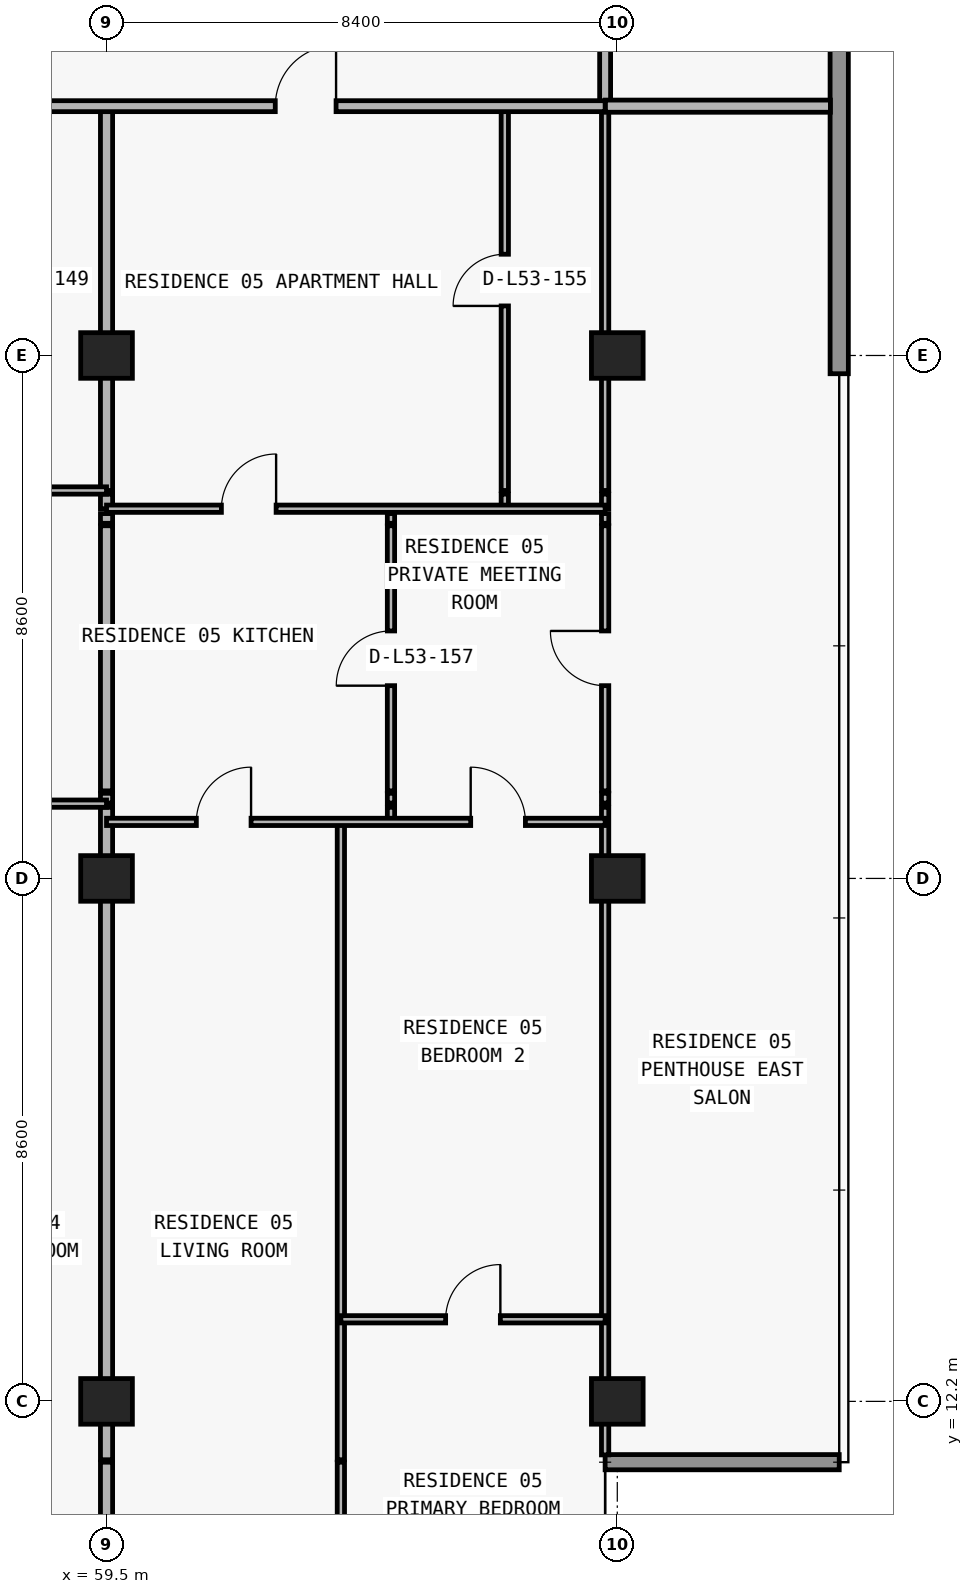
"""IFC4 building model, lengths in metres.
Left out: names, types, materials, properties, quantities, classifications, styles, units other than length and angle.
Written with IfcOpenShell. Run it as: python <this file> out.ifc"""

import sys

from ifc_helpers import new_model, si_unit, direction, frame, frame_2d, origin, origin_2d, place, context, subcontext, project, spatial, rectangle, extrude, element, fill, save


model = new_model("IFC4")
c1 = context("Model", 3, precision=1e-05, world=origin(), true_north=direction((0.0, 1.0)))
c2 = subcontext(c1, "Body", "Model", "MODEL_VIEW")
j1 = project(units=[si_unit("LENGTHUNIT", "METRE"), si_unit("PLANEANGLEUNIT", "RADIAN")], contexts=[c1])
p1 = place(None, origin())
s1 = spatial("IfcSite", under=j1, at=p1, CompositionType="ELEMENT")
p2 = place(p1, origin())
s2 = spatial("IfcBuilding", under=s1, at=p2, CompositionType="ELEMENT")
p3 = place(p2, frame((0.0, 0.0, 191.7)))
s3 = spatial("IfcBuildingStorey", under=s2, at=p3, CompositionType="ELEMENT", Elevation=191.7)
for number, where, z_axis, x_axis in (
    (1, (59.5, 12.2, 0.0), (0.0, 0.0, 1.0), (1.0, 0.0, 0.0)),
    (2, (67.9, 12.2, 0.0), (0.0, 0.0, 1.0), (1.0, 0.0, 0.0)),
    (3, (59.5, 20.8, 0.0), (0.0, 0.0, 1.0), (1.0, 0.0, 0.0)),
    (4, (67.9, 20.8, 0.0), (0.0, 0.0, 1.0), (1.0, 0.0, 0.0)),
    (5, (59.5, 29.4, 0.0), (0.0, 0.0, 1.0), (1.0, 0.0, 0.0)),
    (6, (67.9, 29.4, 0.0), (0.0, 0.0, 1.0), (1.0, 0.0, 0.0)),
):
    element("IfcColumn", number, at=place(p3, frame(where, z_axis=z_axis, x_axis=x_axis)), inside=s3, PredefinedType="COLUMN", context=c2, shape_type="SweptSolid", body=[
        extrude(rectangle(XDim=0.85, YDim=0.75, at=origin_2d()), origin(), (0.0, 0.0, 1.0), 3.05),
    ])
p4 = place(p3, frame((67.7, 11.2, 0.0), z_axis=(0.0, 0.0, 1.0), x_axis=(1.0, 0.0, 0.0)))
e7 = element("IfcWall", 7, at=p4, inside=s3, PredefinedType="ELEMENTEDWALL", context=c2, shape_type="SweptSolid", body=[
    extrude(rectangle(XDim=3.85, YDim=0.25, at=frame_2d((1.925, 0.0))), origin(), (0.0, 0.0, 1.0), 3.05),
])
p5 = place(p3, frame((71.55, 47.0, 0.0), z_axis=(0.0, 0.0, 1.0), x_axis=(0.0, -1.0, 0.0)))
e8 = element("IfcWall", 8, at=p5, inside=s3, PredefinedType="STANDARD", context=c2, shape_type="SweptSolid", body=[
    extrude(rectangle(XDim=17.9, YDim=0.3, at=frame_2d((8.95, 0.0))), origin(), (0.0, 0.0, 1.0), 3.05),
])
p6 = place(p3, frame((59.5, 7.895, 0.0), z_axis=(0.0, 0.0, 1.0), x_axis=(0.0, 1.0, 0.0)))
e9 = element("IfcWall", 9, at=p6, inside=s3, PredefinedType="PARTITIONING", context=c2, shape_type="SweptSolid", body=[
    extrude(rectangle(XDim=3.305, YDim=0.2, at=frame_2d((1.652, 0.0))), origin(), (0.0, 0.0, 1.0), 3.05),
])
p7 = place(p3, frame((59.5, 11.24, 0.0), z_axis=(0.0, 0.0, 1.0), x_axis=(0.0, 1.0, 0.0)))
e10 = element("IfcWall", 10, at=p7, inside=s3, PredefinedType="PARTITIONING", context=c2, shape_type="SweptSolid", body=[
    extrude(rectangle(XDim=10.73, YDim=0.2, at=frame_2d((5.365, 0.0))), origin(), (0.0, 0.0, 1.0), 2.263),
])
p8 = place(p3, frame((59.5, 22.04, 0.0), z_axis=(0.0, 0.0, 1.0), x_axis=(0.0, 1.0, 0.0)))
e11 = element("IfcWall", 11, at=p8, inside=s3, PredefinedType="PARTITIONING", context=c2, shape_type="SweptSolid", body=[
    extrude(rectangle(XDim=0.16, YDim=0.2, at=frame_2d((0.08, 0.0))), origin(), (0.0, 0.0, 1.0), 2.263),
])
p9 = place(p3, frame((59.5, 22.24, 0.0), z_axis=(0.0, 0.0, 1.0), x_axis=(0.0, 1.0, 0.0)))
e12 = element("IfcWall", 12, at=p9, inside=s3, PredefinedType="PARTITIONING", context=c2, shape_type="SweptSolid", body=[
    extrude(rectangle(XDim=4.36, YDim=0.2, at=frame_2d((2.18, 0.0))), origin(), (0.0, 0.0, 1.0), 2.263),
])
p10 = place(p3, frame((59.5, 26.64, 0.0), z_axis=(0.0, 0.0, 1.0), x_axis=(0.0, 1.0, 0.0)))
e13 = element("IfcWall", 13, at=p10, inside=s3, PredefinedType="PARTITIONING", context=c2, shape_type="SweptSolid", body=[
    extrude(rectangle(XDim=0.16, YDim=0.2, at=frame_2d((0.08, 0.0))), origin(), (0.0, 0.0, 1.0), 2.263),
])
p11 = place(p3, frame((59.5, 26.88, 0.0), z_axis=(0.0, 0.0, 1.0), x_axis=(0.0, 1.0, 0.0)))
e14 = element("IfcWall", 14, at=p11, inside=s3, PredefinedType="PARTITIONING", context=c2, shape_type="SweptSolid", body=[
    extrude(rectangle(XDim=0.24, YDim=0.2, at=frame_2d((0.12, 0.0))), origin(), (0.0, 0.0, 1.0), 2.263),
])
p12 = place(p3, frame((59.5, 27.18, 0.0), z_axis=(0.0, 0.0, 1.0), x_axis=(0.0, 1.0, 0.0)))
e15 = element("IfcWall", 15, at=p12, inside=s3, PredefinedType="PARTITIONING", context=c2, shape_type="SweptSolid", body=[
    extrude(rectangle(XDim=6.32, YDim=0.2, at=frame_2d((3.16, 0.0))), origin(), (0.0, 0.0, 1.0), 2.263),
])
p13 = place(p3, frame((63.354, 7.895, 0.0), z_axis=(0.0, 0.0, 1.0), x_axis=(0.0, 1.0, 0.0)))
e16 = element("IfcWall", 16, at=p13, inside=s3, PredefinedType="PARTITIONING", context=c2, shape_type="SweptSolid", body=[
    extrude(rectangle(XDim=3.305, YDim=0.12, at=frame_2d((1.652, 0.0))), origin(), (0.0, 0.0, 1.0), 3.05),
])
p14 = place(p3, frame((63.354, 11.24, 0.0), z_axis=(0.0, 0.0, 1.0), x_axis=(0.0, 1.0, 0.0)))
e17 = element("IfcWall", 17, at=p14, inside=s3, PredefinedType="PARTITIONING", context=c2, shape_type="SweptSolid", body=[
    extrude(rectangle(XDim=10.49, YDim=0.12, at=frame_2d((5.245, 0.0))), origin(), (0.0, 0.0, 1.0), 3.05),
])
p15 = place(p3, frame((64.178, 21.73, 0.0), z_axis=(0.0, 0.0, 1.0), x_axis=(0.0, 1.0, 0.0)))
e18 = element("IfcWall", 18, at=p15, inside=s3, PredefinedType="PARTITIONING", context=c2, shape_type="SweptSolid", body=[
    extrude(rectangle(XDim=0.24, YDim=0.12, at=frame_2d((0.12, 0.0))), origin(), (0.0, 0.0, 1.0), 3.05),
])
p16 = place(p3, frame((64.178, 22.04, 0.0), z_axis=(0.0, 0.0, 1.0), x_axis=(0.0, 1.0, 0.0)))
e19 = element("IfcWall", 19, at=p16, inside=s3, PredefinedType="PARTITIONING", context=c2, shape_type="SweptSolid", body=[
    extrude(rectangle(XDim=0.16, YDim=0.12, at=frame_2d((0.08, 0.0))), origin(), (0.0, 0.0, 1.0), 3.05),
])
p17 = place(p3, frame((64.178, 22.24, 0.0), z_axis=(0.0, 0.0, 1.0), x_axis=(0.0, 1.0, 0.0)))
e20 = element("IfcWall", 20, at=p17, inside=s3, PredefinedType="PARTITIONING", context=c2, shape_type="SweptSolid", body=[
    extrude(rectangle(XDim=4.36, YDim=0.12, at=frame_2d((2.18, 0.0))), origin(), (0.0, 0.0, 1.0), 3.05),
])
p18 = place(p17, frame((1.73, 0.0, 0.0)))
e21 = element("IfcOpeningElement", 21, at=p18, cuts=e20, PredefinedType="OPENING", context=c2, shape_type="SweptSolid", body=[
    extrude(rectangle(XDim=0.9, YDim=2.15, at=frame_2d((0.45, 1.075))), frame((0.0, 0.07, 0.0), z_axis=(0.0, -1.0, 0.0), x_axis=(1.0, 0.0, 0.0)), (0.0, 0.0, 1.0), 0.14),
])
p19 = place(p3, frame((64.178, 26.64, 0.0), z_axis=(0.0, 0.0, 1.0), x_axis=(0.0, 1.0, 0.0)))
e22 = element("IfcWall", 22, at=p19, inside=s3, PredefinedType="PARTITIONING", context=c2, shape_type="SweptSolid", body=[
    extrude(rectangle(XDim=0.16, YDim=0.12, at=frame_2d((0.08, 0.0))), origin(), (0.0, 0.0, 1.0), 3.05),
])
p20 = place(p3, frame((66.05, 26.88, 0.0), z_axis=(0.0, 0.0, 1.0), x_axis=(0.0, 1.0, 0.0)))
e23 = element("IfcWall", 23, at=p20, inside=s3, PredefinedType="PARTITIONING", context=c2, shape_type="SweptSolid", body=[
    extrude(rectangle(XDim=0.24, YDim=0.12, at=frame_2d((0.12, 0.0))), origin(), (0.0, 0.0, 1.0), 2.725),
])
p21 = place(p3, frame((66.05, 27.18, 0.0), z_axis=(0.0, 0.0, 1.0), x_axis=(0.0, 1.0, 0.0)))
e24 = element("IfcWall", 24, at=p21, inside=s3, PredefinedType="PARTITIONING", context=c2, shape_type="SweptSolid", body=[
    extrude(rectangle(XDim=6.32, YDim=0.12, at=frame_2d((3.16, 0.0))), origin(), (0.0, 0.0, 1.0), 2.725),
])
p22 = place(p21, frame((3.035, 0.0, 0.0)))
e25 = element("IfcOpeningElement", 25, at=p22, cuts=e24, PredefinedType="OPENING", context=c2, shape_type="SweptSolid", body=[
    extrude(rectangle(XDim=0.85, YDim=2.1, at=frame_2d((0.425, 1.05))), frame((0.0, 0.07, 0.0), z_axis=(0.0, -1.0, 0.0), x_axis=(1.0, 0.0, 0.0)), (0.0, 0.0, 1.0), 0.14),
])
p23 = place(p3, frame((67.7, 11.32, 0.0), z_axis=(0.0, 0.0, 1.0), x_axis=(0.0, 1.0, 0.0)))
e26 = element("IfcWall", 26, at=p23, inside=s3, PredefinedType="PARTITIONING", context=c2, shape_type="SweptSolid", body=[
    extrude(rectangle(XDim=10.65, YDim=0.12, at=frame_2d((5.325, 0.0))), origin(), (0.0, 0.0, 1.0), 2.263),
])
p24 = place(p3, frame((67.7, 22.04, 0.0), z_axis=(0.0, 0.0, 1.0), x_axis=(0.0, 1.0, 0.0)))
e27 = element("IfcWall", 27, at=p24, inside=s3, PredefinedType="PARTITIONING", context=c2, shape_type="SweptSolid", body=[
    extrude(rectangle(XDim=0.16, YDim=0.12, at=frame_2d((0.08, 0.0))), origin(), (0.0, 0.0, 1.0), 2.263),
])
p25 = place(p3, frame((67.7, 22.24, 0.0), z_axis=(0.0, 0.0, 1.0), x_axis=(0.0, 1.0, 0.0)))
e28 = element("IfcWall", 28, at=p25, inside=s3, PredefinedType="PARTITIONING", context=c2, shape_type="SweptSolid", body=[
    extrude(rectangle(XDim=4.36, YDim=0.12, at=frame_2d((2.18, 0.0))), origin(), (0.0, 0.0, 1.0), 2.263),
])
p26 = place(p25, frame((1.73, 0.0, 0.0)))
e29 = element("IfcOpeningElement", 29, at=p26, cuts=e28, PredefinedType="OPENING", context=c2, shape_type="SweptSolid", body=[
    extrude(rectangle(XDim=0.9, YDim=2.15, at=frame_2d((0.45, 1.075))), frame((0.0, 0.07, 0.0), z_axis=(0.0, -1.0, 0.0), x_axis=(1.0, 0.0, 0.0)), (0.0, 0.0, 1.0), 0.14),
])
p27 = place(p3, frame((67.7, 26.64, 0.0), z_axis=(0.0, 0.0, 1.0), x_axis=(0.0, 1.0, 0.0)))
e30 = element("IfcWall", 30, at=p27, inside=s3, PredefinedType="PARTITIONING", context=c2, shape_type="SweptSolid", body=[
    extrude(rectangle(XDim=0.16, YDim=0.12, at=frame_2d((0.08, 0.0))), origin(), (0.0, 0.0, 1.0), 2.263),
])
p28 = place(p3, frame((67.7, 26.88, 0.0), z_axis=(0.0, 0.0, 1.0), x_axis=(0.0, 1.0, 0.0)))
e31 = element("IfcWall", 31, at=p28, inside=s3, PredefinedType="PARTITIONING", context=c2, shape_type="SweptSolid", body=[
    extrude(rectangle(XDim=0.24, YDim=0.12, at=frame_2d((0.12, 0.0))), origin(), (0.0, 0.0, 1.0), 2.263),
])
p29 = place(p3, frame((67.7, 27.18, 0.0), z_axis=(0.0, 0.0, 1.0), x_axis=(0.0, 1.0, 0.0)))
e32 = element("IfcWall", 32, at=p29, inside=s3, PredefinedType="PARTITIONING", context=c2, shape_type="SweptSolid", body=[
    extrude(rectangle(XDim=6.32, YDim=0.12, at=frame_2d((3.16, 0.0))), origin(), (0.0, 0.0, 1.0), 2.263),
])
p30 = place(p3, frame((67.7, 33.505, 0.0), z_axis=(0.0, 0.0, 1.0), x_axis=(0.0, 1.0, 0.0)))
e33 = element("IfcWall", 33, at=p30, inside=s3, PredefinedType="PARTITIONING", context=c2, shape_type="SweptSolid", body=[
    extrude(rectangle(XDim=3.495, YDim=0.18, at=frame_2d((1.748, 0.0))), origin(), (0.0, 0.0, 1.0), 2.263),
])
p31 = place(p3, frame((63.354, 13.55, 0.0), z_axis=(0.0, 0.0, 1.0), x_axis=(1.0, 0.0, 0.0)))
e34 = element("IfcWall", 34, at=p31, inside=s3, PredefinedType="PARTITIONING", context=c2, shape_type="SweptSolid", body=[
    extrude(rectangle(XDim=4.346, YDim=0.12, at=frame_2d((2.173, 0.0))), origin(), (0.0, 0.0, 1.0), 3.05),
])
p32 = place(p31, frame((1.723, 0.0, 0.0)))
e35 = element("IfcOpeningElement", 35, at=p32, cuts=e34, PredefinedType="OPENING", context=c2, shape_type="SweptSolid", body=[
    extrude(rectangle(XDim=0.9, YDim=2.15, at=frame_2d((0.45, 1.075))), frame((0.0, 0.07, 0.0), z_axis=(0.0, -1.0, 0.0), x_axis=(1.0, 0.0, 0.0)), (0.0, 0.0, 1.0), 0.14),
])
p33 = place(p3, frame((59.5, 21.73, 0.0), z_axis=(0.0, 0.0, 1.0), x_axis=(1.0, 0.0, 0.0)))
e36 = element("IfcWall", 36, at=p33, inside=s3, PredefinedType="PARTITIONING", context=c2, shape_type="SweptSolid", body=[
    extrude(rectangle(XDim=8.2, YDim=0.12, at=frame_2d((4.1, 0.0))), origin(), (0.0, 0.0, 1.0), 3.05),
])
p34 = place(p33, frame((1.477, 0.0, 0.0)))
e37 = element("IfcOpeningElement", 37, at=p34, cuts=e36, PredefinedType="OPENING", context=c2, shape_type="SweptSolid", body=[
    extrude(rectangle(XDim=0.9, YDim=2.15, at=frame_2d((0.45, 1.075))), frame((0.0, 0.07, 0.0), z_axis=(0.0, -1.0, 0.0), x_axis=(1.0, 0.0, 0.0)), (0.0, 0.0, 1.0), 0.14),
])
p35 = place(p33, frame((5.989, 0.0, 0.0)))
e38 = element("IfcOpeningElement", 38, at=p35, cuts=e36, PredefinedType="OPENING", context=c2, shape_type="SweptSolid", body=[
    extrude(rectangle(XDim=0.9, YDim=2.15, at=frame_2d((0.45, 1.075))), frame((0.0, 0.07, 0.0), z_axis=(0.0, -1.0, 0.0), x_axis=(1.0, 0.0, 0.0)), (0.0, 0.0, 1.0), 0.14),
])
p36 = place(p3, frame((51.32, 22.03, 0.0), z_axis=(0.0, 0.0, 1.0), x_axis=(1.0, 0.0, 0.0)))
e39 = element("IfcWall", 39, at=p36, inside=s3, PredefinedType="PARTITIONING", context=c2, shape_type="SweptSolid", body=[
    extrude(rectangle(XDim=8.18, YDim=0.12, at=frame_2d((4.09, 0.0))), origin(), (0.0, 0.0, 1.0), 3.05),
])
p37 = place(p36, frame((1.708, 0.0, 0.0)))
e40 = element("IfcOpeningElement", 40, at=p37, cuts=e39, PredefinedType="OPENING", context=c2, shape_type="SweptSolid", body=[
    extrude(rectangle(XDim=0.9, YDim=2.15, at=frame_2d((0.45, 1.075))), frame((0.0, 0.07, 0.0), z_axis=(0.0, -1.0, 0.0), x_axis=(1.0, 0.0, 0.0)), (0.0, 0.0, 1.0), 0.14),
])
p38 = place(p36, frame((5.84, 0.0, 0.0)))
e41 = element("IfcOpeningElement", 41, at=p38, cuts=e39, PredefinedType="OPENING", context=c2, shape_type="SweptSolid", body=[
    extrude(rectangle(XDim=0.9, YDim=2.15, at=frame_2d((0.45, 1.075))), frame((0.0, 0.07, 0.0), z_axis=(0.0, -1.0, 0.0), x_axis=(1.0, 0.0, 0.0)), (0.0, 0.0, 1.0), 0.14),
])
p39 = place(p3, frame((59.5, 26.88, 0.0), z_axis=(0.0, 0.0, 1.0), x_axis=(1.0, 0.0, 0.0)))
e42 = element("IfcWall", 42, at=p39, inside=s3, PredefinedType="PARTITIONING", context=c2, shape_type="SweptSolid", body=[
    extrude(rectangle(XDim=8.2, YDim=0.12, at=frame_2d((4.1, 0.0))), origin(), (0.0, 0.0, 1.0), 3.05),
])
p40 = place(p39, frame((1.889, 0.0, 0.0)))
e43 = element("IfcOpeningElement", 43, at=p40, cuts=e42, PredefinedType="OPENING", context=c2, shape_type="SweptSolid", body=[
    extrude(rectangle(XDim=0.9, YDim=2.15, at=frame_2d((0.45, 1.075))), frame((0.0, 0.07, 0.0), z_axis=(0.0, -1.0, 0.0), x_axis=(1.0, 0.0, 0.0)), (0.0, 0.0, 1.0), 0.14),
])
p41 = place(p3, frame((51.32, 27.18, 0.0), z_axis=(0.0, 0.0, 1.0), x_axis=(1.0, 0.0, 0.0)))
e44 = element("IfcWall", 44, at=p41, inside=s3, PredefinedType="PARTITIONING", context=c2, shape_type="SweptSolid", body=[
    extrude(rectangle(XDim=8.18, YDim=0.12, at=frame_2d((4.09, 0.0))), origin(), (0.0, 0.0, 1.0), 3.05),
])
p42 = place(p41, frame((1.708, 0.0, 0.0)))
e45 = element("IfcOpeningElement", 45, at=p42, cuts=e44, PredefinedType="OPENING", context=c2, shape_type="SweptSolid", body=[
    extrude(rectangle(XDim=0.9, YDim=2.15, at=frame_2d((0.45, 1.075))), frame((0.0, 0.07, 0.0), z_axis=(0.0, -1.0, 0.0), x_axis=(1.0, 0.0, 0.0)), (0.0, 0.0, 1.0), 0.14),
])
p43 = place(p3, frame((31.4, 33.5, 0.0), z_axis=(0.0, 0.0, 1.0), x_axis=(1.0, 0.0, 0.0)))
e46 = element("IfcWall", 46, at=p43, inside=s3, PredefinedType="PARTITIONING", context=c2, shape_type="SweptSolid", body=[
    extrude(rectangle(XDim=36.3, YDim=0.18, at=frame_2d((18.15, 0.0))), origin(), (0.0, 0.0, 1.0), 3.05),
])
p44 = place(p43, frame((6.231, 0.0, 0.0)))
e47 = element("IfcOpeningElement", 47, at=p44, cuts=e46, PredefinedType="OPENING", context=c2, shape_type="SweptSolid", body=[
    extrude(rectangle(XDim=1.0, YDim=2.2, at=frame_2d((0.5, 1.1))), frame((0.0, 0.1, 0.0), z_axis=(0.0, -1.0, 0.0), x_axis=(1.0, 0.0, 0.0)), (0.0, 0.0, 1.0), 0.2),
])
p45 = place(p43, frame((22.575, 0.0, 0.0)))
e48 = element("IfcOpeningElement", 48, at=p45, cuts=e46, PredefinedType="OPENING", context=c2, shape_type="SweptSolid", body=[
    extrude(rectangle(XDim=1.0, YDim=2.2, at=frame_2d((0.5, 1.1))), frame((0.0, 0.1, 0.0), z_axis=(0.0, -1.0, 0.0), x_axis=(1.0, 0.0, 0.0)), (0.0, 0.0, 1.0), 0.2),
])
p46 = place(p43, frame((30.875, 0.0, 0.0)))
e49 = element("IfcOpeningElement", 49, at=p46, cuts=e46, PredefinedType="OPENING", context=c2, shape_type="SweptSolid", body=[
    extrude(rectangle(XDim=1.0, YDim=2.2, at=frame_2d((0.5, 1.1))), frame((0.0, 0.1, 0.0), z_axis=(0.0, -1.0, 0.0), x_axis=(1.0, 0.0, 0.0)), (0.0, 0.0, 1.0), 0.2),
])
p47 = place(p3, frame((67.705, 33.5, 0.0), z_axis=(0.0, 0.0, 1.0), x_axis=(1.0, 0.0, 0.0)))
e50 = element("IfcWall", 50, at=p47, inside=s3, PredefinedType="PARTITIONING", context=c2, shape_type="SweptSolid", body=[
    extrude(rectangle(XDim=3.7, YDim=0.2, at=frame_2d((1.85, 0.0))), origin(), (0.0, 0.0, 1.0), 3.05),
])
p48 = place(p46, origin())
e51 = element("IfcDoor", 51, at=p48, inside=s3, OperationType="SINGLE_SWING_RIGHT", PredefinedType="DOOR", context=c2, shape_type="SweptSolid", body=[
    extrude(rectangle(XDim=1.0, YDim=2.2, at=frame_2d((0.5, 1.1))), frame((0.0, 0.025, 0.0), z_axis=(0.0, -1.0, 0.0), x_axis=(1.0, 0.0, 0.0)), (0.0, 0.0, 1.0), 0.05),
])
fill(e49, e51)
p49 = place(p22, origin())
e52 = element("IfcDoor", 52, at=p49, inside=s3, OperationType="SINGLE_SWING_LEFT", PredefinedType="DOOR", context=c2, shape_type="SweptSolid", body=[
    extrude(rectangle(XDim=0.85, YDim=2.1, at=frame_2d((0.425, 1.05))), frame((0.0, 0.025, 0.0), z_axis=(0.0, -1.0, 0.0), x_axis=(1.0, 0.0, 0.0)), (0.0, 0.0, 1.0), 0.05),
])
fill(e25, e52)
p50 = place(p40, origin())
e53 = element("IfcDoor", 53, at=p50, inside=s3, OperationType="SINGLE_SWING_RIGHT", PredefinedType="DOOR", context=c2, shape_type="SweptSolid", body=[
    extrude(rectangle(XDim=0.9, YDim=2.15, at=frame_2d((0.45, 1.075))), frame((0.0, 0.025, 0.0), z_axis=(0.0, -1.0, 0.0), x_axis=(1.0, 0.0, 0.0)), (0.0, 0.0, 1.0), 0.05),
])
fill(e43, e53)
p51 = place(p18, origin())
e54 = element("IfcDoor", 54, at=p51, inside=s3, OperationType="SINGLE_SWING_LEFT", PredefinedType="DOOR", context=c2, shape_type="SweptSolid", body=[
    extrude(rectangle(XDim=0.9, YDim=2.15, at=frame_2d((0.45, 1.075))), frame((0.0, 0.025, 0.0), z_axis=(0.0, -1.0, 0.0), x_axis=(1.0, 0.0, 0.0)), (0.0, 0.0, 1.0), 0.05),
])
fill(e21, e54)
p52 = place(p34, origin())
e55 = element("IfcDoor", 55, at=p52, inside=s3, OperationType="SINGLE_SWING_RIGHT", PredefinedType="DOOR", context=c2, shape_type="SweptSolid", body=[
    extrude(rectangle(XDim=0.9, YDim=2.15, at=frame_2d((0.45, 1.075))), frame((0.0, 0.025, 0.0), z_axis=(0.0, -1.0, 0.0), x_axis=(1.0, 0.0, 0.0)), (0.0, 0.0, 1.0), 0.05),
])
fill(e37, e55)
p53 = place(p35, origin())
e56 = element("IfcDoor", 56, at=p53, inside=s3, OperationType="SINGLE_SWING_LEFT", PredefinedType="DOOR", context=c2, shape_type="SweptSolid", body=[
    extrude(rectangle(XDim=0.9, YDim=2.15, at=frame_2d((0.45, 1.075))), frame((0.0, 0.025, 0.0), z_axis=(0.0, -1.0, 0.0), x_axis=(1.0, 0.0, 0.0)), (0.0, 0.0, 1.0), 0.05),
])
fill(e38, e56)
p54 = place(p32, origin())
e57 = element("IfcDoor", 57, at=p54, inside=s3, OperationType="SINGLE_SWING_RIGHT", PredefinedType="DOOR", context=c2, shape_type="SweptSolid", body=[
    extrude(rectangle(XDim=0.9, YDim=2.15, at=frame_2d((0.45, 1.075))), frame((0.0, 0.025, 0.0), z_axis=(0.0, -1.0, 0.0), x_axis=(1.0, 0.0, 0.0)), (0.0, 0.0, 1.0), 0.05),
])
fill(e35, e57)
p55 = place(p26, origin())
e58 = element("IfcDoor", 58, at=p55, inside=s3, OperationType="SINGLE_SWING_RIGHT", PredefinedType="DOOR", context=c2, shape_type="SweptSolid", body=[
    extrude(rectangle(XDim=0.9, YDim=2.15, at=frame_2d((0.45, 1.075))), frame((0.0, 0.025, 0.0), z_axis=(0.0, -1.0, 0.0), x_axis=(1.0, 0.0, 0.0)), (0.0, 0.0, 1.0), 0.05),
])
fill(e29, e58)
save(model, sys.argv[1])
